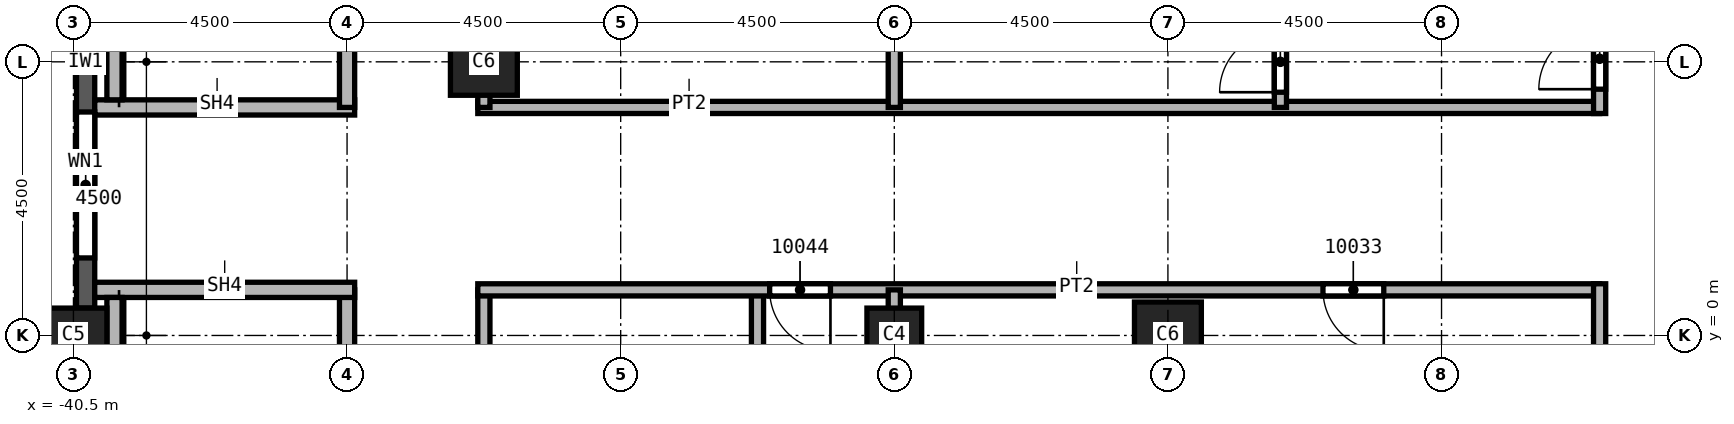
"""IFC4 building model, lengths in metres.
Left out: names, types, materials, properties, quantities, classifications, styles, units other than length and angle.
Written with IfcOpenShell. Run it as: python <this file> out.ifc"""

import sys

from ifc_helpers import new_model, si_unit, direction, frame, frame_2d, origin, origin_2d, place, context, subcontext, project, spatial, rectangle, extrude, element, fill, save


model = new_model("IFC4")
c1 = context("Model", 3, precision=1e-05, world=origin(), true_north=direction((0.0, 1.0)))
c2 = subcontext(c1, "Body", "Model", "MODEL_VIEW")
j1 = project(units=[si_unit("LENGTHUNIT", "METRE"), si_unit("PLANEANGLEUNIT", "RADIAN")], contexts=[c1])
p1 = place(None, origin())
s1 = spatial("IfcSite", under=j1, at=p1, CompositionType="ELEMENT")
p2 = place(p1, origin())
s2 = spatial("IfcBuilding", under=s1, at=p2, CompositionType="ELEMENT")
p3 = place(p2, frame((0.0, 0.0, 170.0)))
s3 = spatial("IfcBuildingStorey", under=s2, at=p3, CompositionType="ELEMENT", Elevation=170.0)
p4 = place(p3, frame((-40.5, 0.0, 0.0), z_axis=(0.0, 0.0, 1.0), x_axis=(0.0, 1.0, 0.0)))
e1 = element("IfcColumn", 1, at=p4, inside=s3, PredefinedType="COLUMN", context=c2, shape_type="SweptSolid", body=[
    extrude(rectangle(XDim=0.9, YDim=1.1, at=origin_2d()), origin(), (0.0, 0.0, 1.0), 3.7),
])
for number, where, z_axis, x_axis in (
    (2, (-33.75, 4.5, 0.0), (0.0, 0.0, 1.0), (1.0, 0.0, 0.0)),
    (3, (-22.5, 0.0, 0.0), (0.0, 0.0, 1.0), (1.0, 0.0, 0.0)),
):
    element("IfcColumn", number, at=place(p3, frame(where, z_axis=z_axis, x_axis=x_axis)), inside=s3, PredefinedType="COLUMN", context=c2, shape_type="SweptSolid", body=[
        extrude(rectangle(XDim=1.1, YDim=1.1, at=origin_2d()), origin(), (0.0, 0.0, 1.0), 3.7),
    ])
p5 = place(p3, frame((-27.0, 0.0, 0.0), z_axis=(0.0, 0.0, 1.0), x_axis=(1.0, 0.0, 0.0)))
e4 = element("IfcColumn", 4, at=p5, inside=s3, PredefinedType="COLUMN", context=c2, shape_type="SweptSolid", body=[
    extrude(rectangle(XDim=0.9, YDim=0.9, at=origin_2d()), origin(), (0.0, 0.0, 1.0), 3.7),
])
p6 = place(p3, frame((-40.3, 8.55, 0.0), z_axis=(0.0, 0.0, 1.0), x_axis=(0.0, -1.0, 0.0)))
e5 = element("IfcWall", 5, at=p6, inside=s3, PredefinedType="SOLIDWALL", context=c2, shape_type="SweptSolid", body=[
    extrude(rectangle(XDim=8.1, YDim=0.3, at=frame_2d((4.05, 0.0))), origin(), (0.0, 0.0, 1.0), 3.1),
])
p7 = place(p6, frame((0.825, 0.0, 0.8)))
e6 = element("IfcOpeningElement", 6, at=p7, cuts=e5, PredefinedType="OPENING", context=c2, shape_type="SweptSolid", body=[
    extrude(rectangle(XDim=2.4, YDim=1.95, at=frame_2d((1.2, 0.975))), frame((0.0, 0.15, 0.0), z_axis=(0.0, -1.0, 0.0), x_axis=(1.0, 0.0, 0.0)), (0.0, 0.0, 1.0), 0.3),
])
p8 = place(p6, frame((4.875, 0.0, 0.8)))
e7 = element("IfcOpeningElement", 7, at=p8, cuts=e5, PredefinedType="OPENING", context=c2, shape_type="SweptSolid", body=[
    extrude(rectangle(XDim=2.4, YDim=1.95, at=frame_2d((1.2, 0.975))), frame((0.0, 0.15, 0.0), z_axis=(0.0, -1.0, 0.0), x_axis=(1.0, 0.0, 0.0)), (0.0, 0.0, 1.0), 0.3),
])
p9 = place(p3, frame((-33.85, 3.75, 0.0), z_axis=(0.0, 0.0, 1.0), x_axis=(1.0, 0.0, 0.0)))
e8 = element("IfcWall", 8, at=p9, inside=s3, PredefinedType="PARTITIONING", context=c2, shape_type="SweptSolid", body=[
    extrude(rectangle(XDim=18.45, YDim=0.2, at=frame_2d((9.225, 0.0))), origin(), (0.0, 0.0, 1.0), 3.7),
])
p10 = place(p3, frame((-33.75, 0.75, 0.0), z_axis=(0.0, 0.0, 1.0), x_axis=(0.0, -1.0, 0.0)))
e9 = element("IfcWall", 9, at=p10, inside=s3, PredefinedType="PARTITIONING", context=c2, shape_type="SweptSolid", body=[
    extrude(rectangle(XDim=7.6, YDim=0.2, at=frame_2d((3.8, 0.0))), origin(), (0.0, 0.0, 1.0), 3.7),
])
p11 = place(p10, frame((6.1, 0.0, 0.0)))
e10 = element("IfcOpeningElement", 10, at=p11, cuts=e9, PredefinedType="OPENING", context=c2, shape_type="SweptSolid", body=[
    extrude(rectangle(XDim=1.0, YDim=2.1, at=frame_2d((0.5, 1.05))), frame((0.0, 0.1, 0.0), z_axis=(0.0, -1.0, 0.0), x_axis=(1.0, 0.0, 0.0)), (0.0, 0.0, 1.0), 0.2),
])
p12 = place(p3, frame((-33.75, 11.25, 0.0), z_axis=(0.0, 0.0, 1.0), x_axis=(0.0, -1.0, 0.0)))
e11 = element("IfcWall", 11, at=p12, inside=s3, PredefinedType="PARTITIONING", context=c2, shape_type="SweptSolid", body=[
    extrude(rectangle(XDim=7.5, YDim=0.2, at=frame_2d((3.75, 0.0))), origin(), (0.0, 0.0, 1.0), 3.7),
])
p13 = place(p12, frame((4.9, 0.0, 0.0)))
e12 = element("IfcOpeningElement", 12, at=p13, cuts=e11, PredefinedType="OPENING", context=c2, shape_type="SweptSolid", body=[
    extrude(rectangle(XDim=1.0, YDim=2.1, at=frame_2d((0.5, 1.05))), frame((0.0, 0.1, 0.0), z_axis=(0.0, -1.0, 0.0), x_axis=(1.0, 0.0, 0.0)), (0.0, 0.0, 1.0), 0.2),
])
p14 = place(p3, frame((-29.25, 0.75, 0.0), z_axis=(0.0, 0.0, 1.0), x_axis=(0.0, -1.0, 0.0)))
e13 = element("IfcWall", 13, at=p14, inside=s3, PredefinedType="PARTITIONING", context=c2, shape_type="SweptSolid", body=[
    extrude(rectangle(XDim=18.4, YDim=0.2, at=frame_2d((9.2, 0.0))), origin(), (0.0, 0.0, 1.0), 3.7),
])
p15 = place(p3, frame((-15.4, 0.75, 0.0), z_axis=(0.0, 0.0, 1.0), x_axis=(-1.0, 0.0, 0.0)))
e14 = element("IfcWall", 14, at=p15, inside=s3, PredefinedType="PARTITIONING", context=c2, shape_type="SweptSolid", body=[
    extrude(rectangle(XDim=18.45, YDim=0.2, at=frame_2d((9.225, 0.0))), origin(), (0.0, 0.0, 1.0), 3.7),
])
p16 = place(p15, frame((3.55, 0.0, 0.0)))
e15 = element("IfcOpeningElement", 15, at=p16, cuts=e14, PredefinedType="OPENING", context=c2, shape_type="SweptSolid", body=[
    extrude(rectangle(XDim=1.0, YDim=2.1, at=frame_2d((0.5, 1.05))), frame((0.0, 0.1, 0.0), z_axis=(0.0, -1.0, 0.0), x_axis=(1.0, 0.0, 0.0)), (0.0, 0.0, 1.0), 0.2),
])
p17 = place(p15, frame((12.65, 0.0, 0.0)))
e16 = element("IfcOpeningElement", 16, at=p17, cuts=e14, PredefinedType="OPENING", context=c2, shape_type="SweptSolid", body=[
    extrude(rectangle(XDim=1.0, YDim=2.1, at=frame_2d((0.5, 1.05))), frame((0.0, 0.1, 0.0), z_axis=(0.0, -1.0, 0.0), x_axis=(1.0, 0.0, 0.0)), (0.0, 0.0, 1.0), 0.2),
])
p18 = place(p3, frame((-27.0, -17.45, 0.0), z_axis=(0.0, 0.0, 1.0), x_axis=(0.0, 1.0, 0.0)))
e17 = element("IfcWall", 17, at=p18, inside=s3, PredefinedType="PARTITIONING", context=c2, shape_type="SweptSolid", body=[
    extrude(rectangle(XDim=18.2, YDim=0.2, at=frame_2d((9.1, 0.0))), origin(), (0.0, 0.0, 1.0), 3.7),
])
p19 = place(p3, frame((-27.0, 3.75, 0.0), z_axis=(0.0, 0.0, 1.0), x_axis=(0.0, 1.0, 0.0)))
e18 = element("IfcWall", 18, at=p19, inside=s3, PredefinedType="PARTITIONING", context=c2, shape_type="SweptSolid", body=[
    extrude(rectangle(XDim=13.7, YDim=0.2, at=frame_2d((6.85, 0.0))), origin(), (0.0, 0.0, 1.0), 3.7),
])
p20 = place(p3, frame((-20.65, 3.75, 0.0), z_axis=(0.0, 0.0, 1.0), x_axis=(0.0, 1.0, 0.0)))
e19 = element("IfcWall", 19, at=p20, inside=s3, PredefinedType="PARTITIONING", context=c2, shape_type="SweptSolid", body=[
    extrude(rectangle(XDim=5.35, YDim=0.2, at=frame_2d((2.675, 0.0))), origin(), (0.0, 0.0, 1.0), 3.7),
])
p21 = place(p20, frame((0.25, 0.0, 0.0)))
e20 = element("IfcOpeningElement", 20, at=p21, cuts=e19, PredefinedType="OPENING", context=c2, shape_type="SweptSolid", body=[
    extrude(rectangle(XDim=1.0, YDim=2.1, at=frame_2d((0.5, 1.05))), frame((0.0, 0.1, 0.0), z_axis=(0.0, -1.0, 0.0), x_axis=(1.0, 0.0, 0.0)), (0.0, 0.0, 1.0), 0.2),
])
p22 = place(p3, frame((-15.4, -23.25, 0.0), z_axis=(0.0, 0.0, 1.0), x_axis=(0.0, 1.0, 0.0)))
e21 = element("IfcWall", 21, at=p22, inside=s3, PredefinedType="PARTITIONING", context=c2, shape_type="SweptSolid", body=[
    extrude(rectangle(XDim=24.1, YDim=0.2, at=frame_2d((12.05, 0.0))), origin(), (0.0, 0.0, 1.0), 3.7),
])
p23 = place(p22, frame((4.0, 0.0, 0.0)))
e22 = element("IfcOpeningElement", 22, at=p23, cuts=e21, PredefinedType="OPENING", context=c2, shape_type="SweptSolid", body=[
    extrude(rectangle(XDim=1.0, YDim=2.1, at=frame_2d((0.5, 1.05))), frame((0.0, 0.1, 0.0), z_axis=(0.0, -1.0, 0.0), x_axis=(1.0, 0.0, 0.0)), (0.0, 0.0, 1.0), 0.2),
])
p24 = place(p22, frame((10.2, 0.0, 0.0)))
e23 = element("IfcOpeningElement", 23, at=p24, cuts=e21, PredefinedType="OPENING", context=c2, shape_type="SweptSolid", body=[
    extrude(rectangle(XDim=1.0, YDim=2.1, at=frame_2d((0.5, 1.05))), frame((0.0, 0.1, 0.0), z_axis=(0.0, -1.0, 0.0), x_axis=(1.0, 0.0, 0.0)), (0.0, 0.0, 1.0), 0.2),
])
p25 = place(p22, frame((15.15, 0.0, 0.0)))
e24 = element("IfcOpeningElement", 24, at=p25, cuts=e21, PredefinedType="OPENING", context=c2, shape_type="SweptSolid", body=[
    extrude(rectangle(XDim=1.0, YDim=2.1, at=frame_2d((0.5, 1.05))), frame((0.0, 0.1, 0.0), z_axis=(0.0, -1.0, 0.0), x_axis=(1.0, 0.0, 0.0)), (0.0, 0.0, 1.0), 0.2),
])
p26 = place(p3, frame((-15.4, 3.65, 0.0), z_axis=(0.0, 0.0, 1.0), x_axis=(0.0, 1.0, 0.0)))
e25 = element("IfcWall", 25, at=p26, inside=s3, PredefinedType="PARTITIONING", context=c2, shape_type="SweptSolid", body=[
    extrude(rectangle(XDim=9.95, YDim=0.2, at=frame_2d((4.975, 0.0))), origin(), (0.0, 0.0, 1.0), 3.7),
])
p27 = place(p26, frame((0.4, 0.0, 0.0)))
e26 = element("IfcOpeningElement", 26, at=p27, cuts=e25, PredefinedType="OPENING", context=c2, shape_type="SweptSolid", body=[
    extrude(rectangle(XDim=1.0, YDim=2.1, at=frame_2d((0.5, 1.05))), frame((0.0, 0.1, 0.0), z_axis=(0.0, -1.0, 0.0), x_axis=(1.0, 0.0, 0.0)), (0.0, 0.0, 1.0), 0.2),
])
p28 = place(p3, frame((-40.15, 3.75, 0.0), z_axis=(0.0, 0.0, 1.0), x_axis=(1.0, 0.0, 0.0)))
e27 = element("IfcWall", 27, at=p28, inside=s3, PredefinedType="SOLIDWALL", context=c2, shape_type="SweptSolid", body=[
    extrude(rectangle(XDim=4.275, YDim=0.25, at=frame_2d((2.137, 0.0))), origin(), (0.0, 0.0, 1.0), 3.7),
])
p29 = place(p3, frame((-36.0, 0.75, 0.0), z_axis=(0.0, 0.0, 1.0), x_axis=(0.0, -1.0, 0.0)))
e28 = element("IfcWall", 28, at=p29, inside=s3, PredefinedType="SOLIDWALL", context=c2, shape_type="SweptSolid", body=[
    extrude(rectangle(XDim=7.625, YDim=0.25, at=frame_2d((3.812, 0.0))), origin(), (0.0, 0.0, 1.0), 3.7),
])
p30 = place(p29, frame((5.95, 0.0, 0.0)))
e29 = element("IfcOpeningElement", 29, at=p30, cuts=e28, PredefinedType="OPENING", context=c2, shape_type="SweptSolid", body=[
    extrude(rectangle(XDim=1.2, YDim=2.1, at=frame_2d((0.6, 1.05))), frame((0.0, 0.125, 0.0), z_axis=(0.0, -1.0, 0.0), x_axis=(1.0, 0.0, 0.0)), (0.0, 0.0, 1.0), 0.25),
])
p31 = place(p3, frame((-36.0, 11.375, 0.0), z_axis=(0.0, 0.0, 1.0), x_axis=(0.0, -1.0, 0.0)))
e30 = element("IfcWall", 30, at=p31, inside=s3, PredefinedType="SOLIDWALL", context=c2, shape_type="SweptSolid", body=[
    extrude(rectangle(XDim=7.625, YDim=0.25, at=frame_2d((3.812, 0.0))), origin(), (0.0, 0.0, 1.0), 3.7),
])
p32 = place(p31, frame((0.4, 0.0, 0.0)))
e31 = element("IfcOpeningElement", 31, at=p32, cuts=e30, PredefinedType="OPENING", context=c2, shape_type="SweptSolid", body=[
    extrude(rectangle(XDim=1.2, YDim=2.1, at=frame_2d((0.6, 1.05))), frame((0.0, 0.125, 0.0), z_axis=(0.0, -1.0, 0.0), x_axis=(1.0, 0.0, 0.0)), (0.0, 0.0, 1.0), 0.25),
])
p33 = place(p3, frame((-35.875, 0.75, 0.0), z_axis=(0.0, 0.0, 1.0), x_axis=(-1.0, 0.0, 0.0)))
e32 = element("IfcWall", 32, at=p33, inside=s3, PredefinedType="SOLIDWALL", context=c2, shape_type="SweptSolid", body=[
    extrude(rectangle(XDim=4.275, YDim=0.25, at=frame_2d((2.137, 0.0))), origin(), (0.0, 0.0, 1.0), 3.7),
])
for number, where, z_axis, x_axis in (
    (33, (-39.825, 3.875, 0.0), (0.0, 0.0, 1.0), (0.0, 1.0, 0.0)),
    (34, (-39.825, -6.625, 0.0), (0.0, 0.0, 1.0), (0.0, 1.0, 0.0)),
):
    element("IfcWall", number, at=place(p3, frame(where, z_axis=z_axis, x_axis=x_axis)), inside=s3, PredefinedType="SOLIDWALL", context=c2, shape_type="SweptSolid", body=[
        extrude(rectangle(XDim=7.25, YDim=0.25, at=frame_2d((3.625, 0.0))), origin(), (0.0, 0.0, 1.0), 3.7),
    ])
p34 = place(p8, origin())
e35 = element("IfcWindow", 35, at=p34, inside=s3, PartitioningType="SINGLE_PANEL", PredefinedType="WINDOW", context=c2, shape_type="SweptSolid", body=[
    extrude(rectangle(XDim=2.4, YDim=1.95, at=frame_2d((1.2, 0.975))), frame((0.0, 0.03, 0.0), z_axis=(0.0, -1.0, 0.0), x_axis=(1.0, 0.0, 0.0)), (0.0, 0.0, 1.0), 0.06),
])
fill(e7, e35)
p35 = place(p27, origin())
e36 = element("IfcDoor", 36, at=p35, inside=s3, OperationType="SINGLE_SWING_LEFT", PredefinedType="DOOR", context=c2, shape_type="SweptSolid", body=[
    extrude(rectangle(XDim=1.0, YDim=2.1, at=frame_2d((0.5, 1.05))), frame((0.0, 0.025, 0.0), z_axis=(0.0, -1.0, 0.0), x_axis=(1.0, 0.0, 0.0)), (0.0, 0.0, 1.0), 0.05),
])
fill(e26, e36)
p36 = place(p21, origin())
e37 = element("IfcDoor", 37, at=p36, inside=s3, OperationType="SINGLE_SWING_RIGHT", PredefinedType="DOOR", context=c2, shape_type="SweptSolid", body=[
    extrude(rectangle(XDim=1.0, YDim=2.1, at=frame_2d((0.5, 1.05))), frame((0.0, 0.025, 0.0), z_axis=(0.0, -1.0, 0.0), x_axis=(1.0, 0.0, 0.0)), (0.0, 0.0, 1.0), 0.05),
])
fill(e20, e37)
p37 = place(p16, origin())
e38 = element("IfcDoor", 38, at=p37, inside=s3, OperationType="SINGLE_SWING_RIGHT", PredefinedType="DOOR", context=c2, shape_type="SweptSolid", body=[
    extrude(rectangle(XDim=1.0, YDim=2.1, at=frame_2d((0.5, 1.05))), frame((0.0, 0.025, 0.0), z_axis=(0.0, -1.0, 0.0), x_axis=(1.0, 0.0, 0.0)), (0.0, 0.0, 1.0), 0.05),
])
fill(e15, e38)
p38 = place(p17, origin())
e39 = element("IfcDoor", 39, at=p38, inside=s3, OperationType="SINGLE_SWING_LEFT", PredefinedType="DOOR", context=c2, shape_type="SweptSolid", body=[
    extrude(rectangle(XDim=1.0, YDim=2.1, at=frame_2d((0.5, 1.05))), frame((0.0, 0.025, 0.0), z_axis=(0.0, -1.0, 0.0), x_axis=(1.0, 0.0, 0.0)), (0.0, 0.0, 1.0), 0.05),
])
fill(e16, e39)
save(model, sys.argv[1])
